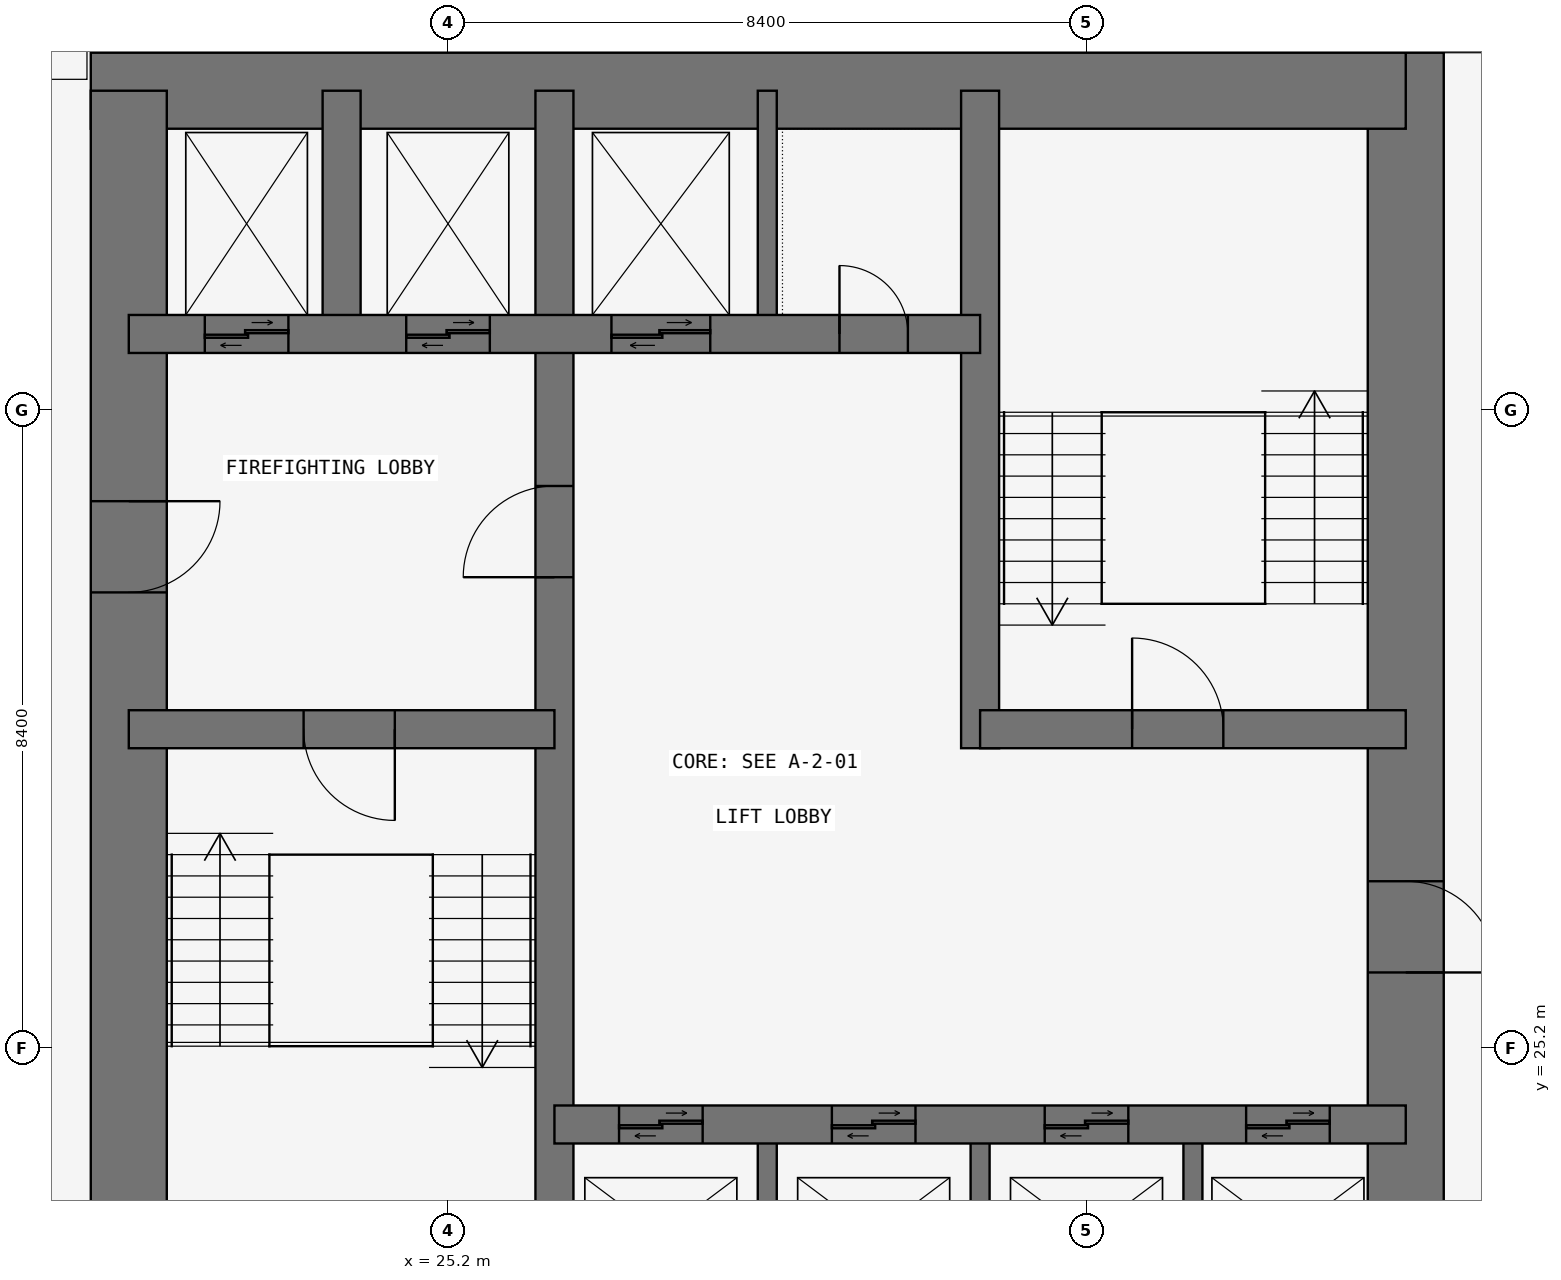
"""IFC4 building model, lengths in metres.
Left out: names, types, materials, properties, quantities, classifications, styles, units other than length and angle.
Written with IfcOpenShell. Run it as: python <this file> out.ifc"""

import sys

from ifc_helpers import new_model, si_unit, direction, frame, frame_2d, origin, place, context, subcontext, project, spatial, rectangle, extrude, element, fill, save


model = new_model("IFC4")
c1 = context("Model", 3, precision=1e-05, world=origin(), true_north=direction((0.0, 1.0)))
c2 = subcontext(c1, "Body", "Model", "MODEL_VIEW")
j1 = project(units=[si_unit("LENGTHUNIT", "METRE"), si_unit("PLANEANGLEUNIT", "RADIAN")], contexts=[c1])
p1 = place(None, origin())
s1 = spatial("IfcSite", under=j1, at=p1, CompositionType="ELEMENT")
p2 = place(p1, origin())
s2 = spatial("IfcBuilding", under=s1, at=p2, CompositionType="ELEMENT")
p3 = place(p2, frame((0.0, 0.0, -7.2)))
s3 = spatial("IfcBuildingStorey", under=s2, at=p3, CompositionType="ELEMENT", Elevation=-7.2)
p4 = place(p3, frame((37.8, 21.0, -0.4), z_axis=(0.0, 0.0, 1.0), x_axis=(0.0, 1.0, 0.0)))
e1 = element("IfcWall", 1, at=p4, inside=s3, PredefinedType="SHEAR", context=c2, shape_type="SweptSolid", body=[
    extrude(rectangle(XDim=17.3, YDim=1.0, at=frame_2d((8.65, 0.0))), origin(), (0.0, 0.0, 1.0), 4.0),
])
p5 = place(p4, frame((5.2, 0.0, 0.4)))
e2 = element("IfcOpeningElement", 2, at=p5, cuts=e1, PredefinedType="OPENING", context=c2, shape_type="SweptSolid", body=[
    extrude(rectangle(XDim=1.2, YDim=2.1, at=frame_2d((0.6, 1.05))), frame((0.0, 0.51, 0.0), z_axis=(0.0, -1.0, 0.0), x_axis=(1.0, 0.0, 0.0)), (0.0, 0.0, 1.0), 1.02),
])
p6 = place(p3, frame((37.8, 37.8, -0.4), z_axis=(0.0, 0.0, 1.0), x_axis=(-1.0, 0.0, 0.0)))
e3 = element("IfcWall", 3, at=p6, inside=s3, PredefinedType="SHEAR", context=c2, shape_type="SweptSolid", body=[
    extrude(rectangle(XDim=17.3, YDim=1.0, at=frame_2d((8.65, 0.0))), origin(), (0.0, 0.0, 1.0), 4.0),
])
p7 = place(p3, frame((21.0, 37.8, -0.4), z_axis=(0.0, 0.0, 1.0), x_axis=(0.0, -1.0, 0.0)))
e4 = element("IfcWall", 4, at=p7, inside=s3, PredefinedType="SHEAR", context=c2, shape_type="SweptSolid", body=[
    extrude(rectangle(XDim=17.3, YDim=1.0, at=frame_2d((8.65, 0.0))), origin(), (0.0, 0.0, 1.0), 4.0),
])
p8 = place(p7, frame((5.4, 0.0, 0.4)))
e5 = element("IfcOpeningElement", 5, at=p8, cuts=e4, PredefinedType="OPENING", context=c2, shape_type="SweptSolid", body=[
    extrude(rectangle(XDim=1.2, YDim=2.1, at=frame_2d((0.6, 1.05))), frame((0.0, 0.51, 0.0), z_axis=(0.0, -1.0, 0.0), x_axis=(1.0, 0.0, 0.0)), (0.0, 0.0, 1.0), 1.02),
])
p9 = place(p3, frame((26.6, 21.0, -0.4), z_axis=(0.0, 0.0, 1.0), x_axis=(0.0, 1.0, 0.0)))
e6 = element("IfcWall", 6, at=p9, inside=s3, PredefinedType="SHEAR", context=c2, shape_type="SweptSolid", body=[
    extrude(rectangle(XDim=16.8, YDim=0.5, at=frame_2d((8.4, 0.0))), origin(), (0.0, 0.0, 1.0), 4.0),
])
p10 = place(p9, frame((10.4, 0.0, 0.4)))
e7 = element("IfcOpeningElement", 7, at=p10, cuts=e6, PredefinedType="OPENING", context=c2, shape_type="SweptSolid", body=[
    extrude(rectangle(XDim=1.2, YDim=2.1, at=frame_2d((0.6, 1.05))), frame((0.0, 0.26, 0.0), z_axis=(0.0, -1.0, 0.0), x_axis=(1.0, 0.0, 0.0)), (0.0, 0.0, 1.0), 0.52),
])
p11 = place(p3, frame((21.0, 29.4, -0.4), z_axis=(0.0, 0.0, 1.0), x_axis=(1.0, 0.0, 0.0)))
e8 = element("IfcWall", 8, at=p11, inside=s3, PredefinedType="SHEAR", context=c2, shape_type="SweptSolid", body=[
    extrude(rectangle(XDim=5.6, YDim=0.5, at=frame_2d((2.8, 0.0))), origin(), (0.0, 0.0, 1.0), 4.0),
])
p12 = place(p11, frame((2.3, 0.0, 0.4)))
e9 = element("IfcOpeningElement", 9, at=p12, cuts=e8, PredefinedType="OPENING", context=c2, shape_type="SweptSolid", body=[
    extrude(rectangle(XDim=1.2, YDim=2.1, at=frame_2d((0.6, 1.05))), frame((0.0, 0.26, 0.0), z_axis=(0.0, -1.0, 0.0), x_axis=(1.0, 0.0, 0.0)), (0.0, 0.0, 1.0), 0.52),
])
p13 = place(p3, frame((21.0, 34.6, -0.4), z_axis=(0.0, 0.0, 1.0), x_axis=(1.0, 0.0, 0.0)))
e10 = element("IfcWall", 10, at=p13, inside=s3, PredefinedType="SHEAR", context=c2, shape_type="SweptSolid", body=[
    extrude(rectangle(XDim=11.2, YDim=0.5, at=frame_2d((5.6, 0.0))), origin(), (0.0, 0.0, 1.0), 4.0),
])
p14 = place(p13, frame((9.35, 0.0, 0.4)))
e11 = element("IfcOpeningElement", 11, at=p14, cuts=e10, PredefinedType="OPENING", context=c2, shape_type="SweptSolid", body=[
    extrude(rectangle(XDim=0.9, YDim=2.1, at=frame_2d((0.45, 1.05))), frame((0.0, 0.26, 0.0), z_axis=(0.0, -1.0, 0.0), x_axis=(1.0, 0.0, 0.0)), (0.0, 0.0, 1.0), 0.52),
])
p15 = place(p13, frame((1.0, 0.0, 0.4)))
e12 = element("IfcOpeningElement", 12, at=p15, cuts=e10, PredefinedType="OPENING", context=c2, shape_type="SweptSolid", body=[
    extrude(rectangle(XDim=1.1, YDim=2.1, at=frame_2d((0.55, 1.05))), frame((0.0, 0.26, 0.0), z_axis=(0.0, -1.0, 0.0), x_axis=(1.0, 0.0, 0.0)), (0.0, 0.0, 1.0), 0.52),
])
p16 = place(p13, frame((3.65, 0.0, 0.4)))
e13 = element("IfcOpeningElement", 13, at=p16, cuts=e10, PredefinedType="OPENING", context=c2, shape_type="SweptSolid", body=[
    extrude(rectangle(XDim=1.1, YDim=2.1, at=frame_2d((0.55, 1.05))), frame((0.0, 0.26, 0.0), z_axis=(0.0, -1.0, 0.0), x_axis=(1.0, 0.0, 0.0)), (0.0, 0.0, 1.0), 0.52),
])
p17 = place(p13, frame((6.35, 0.0, 0.4)))
e14 = element("IfcOpeningElement", 14, at=p17, cuts=e10, PredefinedType="OPENING", context=c2, shape_type="SweptSolid", body=[
    extrude(rectangle(XDim=1.3, YDim=2.1, at=frame_2d((0.65, 1.05))), frame((0.0, 0.26, 0.0), z_axis=(0.0, -1.0, 0.0), x_axis=(1.0, 0.0, 0.0)), (0.0, 0.0, 1.0), 0.52),
])
p18 = place(p3, frame((23.8, 34.6, -0.4), z_axis=(0.0, 0.0, 1.0), x_axis=(0.0, 1.0, 0.0)))
e15 = element("IfcWall", 15, at=p18, inside=s3, PredefinedType="SHEAR", context=c2, shape_type="SweptSolid", body=[
    extrude(rectangle(XDim=3.2, YDim=0.5, at=frame_2d((1.6, 0.0))), origin(), (0.0, 0.0, 1.0), 4.0),
])
p19 = place(p3, frame((26.6, 24.2, -0.4), z_axis=(0.0, 0.0, 1.0), x_axis=(1.0, 0.0, 0.0)))
e16 = element("IfcWall", 16, at=p19, inside=s3, PredefinedType="SHEAR", context=c2, shape_type="SweptSolid", body=[
    extrude(rectangle(XDim=11.2, YDim=0.5, at=frame_2d((5.6, 0.0))), origin(), (0.0, 0.0, 1.0), 4.0),
])
p20 = place(p19, frame((0.85, 0.0, 0.4)))
e17 = element("IfcOpeningElement", 17, at=p20, cuts=e16, PredefinedType="OPENING", context=c2, shape_type="SweptSolid", body=[
    extrude(rectangle(XDim=1.1, YDim=2.1, at=frame_2d((0.55, 1.05))), frame((0.0, 0.26, 0.0), z_axis=(0.0, -1.0, 0.0), x_axis=(1.0, 0.0, 0.0)), (0.0, 0.0, 1.0), 0.52),
])
p21 = place(p19, frame((3.65, 0.0, 0.4)))
e18 = element("IfcOpeningElement", 18, at=p21, cuts=e16, PredefinedType="OPENING", context=c2, shape_type="SweptSolid", body=[
    extrude(rectangle(XDim=1.1, YDim=2.1, at=frame_2d((0.55, 1.05))), frame((0.0, 0.26, 0.0), z_axis=(0.0, -1.0, 0.0), x_axis=(1.0, 0.0, 0.0)), (0.0, 0.0, 1.0), 0.52),
])
p22 = place(p19, frame((6.45, 0.0, 0.4)))
e19 = element("IfcOpeningElement", 19, at=p22, cuts=e16, PredefinedType="OPENING", context=c2, shape_type="SweptSolid", body=[
    extrude(rectangle(XDim=1.1, YDim=2.1, at=frame_2d((0.55, 1.05))), frame((0.0, 0.26, 0.0), z_axis=(0.0, -1.0, 0.0), x_axis=(1.0, 0.0, 0.0)), (0.0, 0.0, 1.0), 0.52),
])
p23 = place(p19, frame((9.1, 0.0, 0.4)))
e20 = element("IfcOpeningElement", 20, at=p23, cuts=e16, PredefinedType="OPENING", context=c2, shape_type="SweptSolid", body=[
    extrude(rectangle(XDim=1.1, YDim=2.1, at=frame_2d((0.55, 1.05))), frame((0.0, 0.26, 0.0), z_axis=(0.0, -1.0, 0.0), x_axis=(1.0, 0.0, 0.0)), (0.0, 0.0, 1.0), 0.52),
])
p24 = place(p3, frame((32.2, 29.15, -0.4), z_axis=(0.0, 0.0, 1.0), x_axis=(0.0, 1.0, 0.0)))
e21 = element("IfcWall", 21, at=p24, inside=s3, PredefinedType="SHEAR", context=c2, shape_type="SweptSolid", body=[
    extrude(rectangle(XDim=8.65, YDim=0.5, at=frame_2d((4.325, 0.0))), origin(), (0.0, 0.0, 1.0), 4.0),
])
p25 = place(p3, frame((32.2, 29.4, -0.4), z_axis=(0.0, 0.0, 1.0), x_axis=(1.0, 0.0, 0.0)))
e22 = element("IfcWall", 22, at=p25, inside=s3, PredefinedType="SHEAR", context=c2, shape_type="SweptSolid", body=[
    extrude(rectangle(XDim=5.6, YDim=0.5, at=frame_2d((2.8, 0.0))), origin(), (0.0, 0.0, 1.0), 4.0),
])
p26 = place(p25, frame((2.0, 0.0, 0.4)))
e23 = element("IfcOpeningElement", 23, at=p26, cuts=e22, PredefinedType="OPENING", context=c2, shape_type="SweptSolid", body=[
    extrude(rectangle(XDim=1.2, YDim=2.1, at=frame_2d((0.6, 1.05))), frame((0.0, 0.26, 0.0), z_axis=(0.0, -1.0, 0.0), x_axis=(1.0, 0.0, 0.0)), (0.0, 0.0, 1.0), 0.52),
])
for number, where, z_axis, x_axis in (
    (24, (29.4, 21.0, -0.4), (0.0, 0.0, 1.0), (0.0, 1.0, 0.0)),
    (25, (32.2, 21.0, -0.4), (0.0, 0.0, 1.0), (0.0, 1.0, 0.0)),
    (26, (35.0, 21.0, -0.4), (0.0, 0.0, 1.0), (0.0, 1.0, 0.0)),
    (27, (29.4, 34.6, -0.4), (0.0, 0.0, 1.0), (0.0, 1.0, 0.0)),
):
    element("IfcWall", number, at=place(p3, frame(where, z_axis=z_axis, x_axis=x_axis)), inside=s3, PredefinedType="SHEAR", context=c2, shape_type="SweptSolid", body=[
        extrude(rectangle(XDim=3.2, YDim=0.25, at=frame_2d((1.6, 0.0))), origin(), (0.0, 0.0, 1.0), 4.0),
    ])
p27 = place(p8, origin())
e28 = element("IfcDoor", 28, at=p27, inside=s3, OperationType="SINGLE_SWING_LEFT", PredefinedType="DOOR", context=c2, shape_type="SweptSolid", body=[
    extrude(rectangle(XDim=1.2, YDim=2.1, at=frame_2d((0.6, 1.05))), frame((0.0, 0.025, 0.0), z_axis=(0.0, -1.0, 0.0), x_axis=(1.0, 0.0, 0.0)), (0.0, 0.0, 1.0), 0.05),
])
fill(e5, e28)
p28 = place(p12, frame((1.2, 0.0, 0.0), z_axis=(0.0, 0.0, 1.0), x_axis=(-1.0, 0.0, 0.0)))
e29 = element("IfcDoor", 29, at=p28, inside=s3, OperationType="SINGLE_SWING_LEFT", PredefinedType="DOOR", context=c2, shape_type="SweptSolid", body=[
    extrude(rectangle(XDim=1.2, YDim=2.1, at=frame_2d((0.6, 1.05))), frame((0.0, 0.025, 0.0), z_axis=(0.0, -1.0, 0.0), x_axis=(1.0, 0.0, 0.0)), (0.0, 0.0, 1.0), 0.05),
])
fill(e9, e29)
p29 = place(p10, origin())
e30 = element("IfcDoor", 30, at=p29, inside=s3, OperationType="SINGLE_SWING_LEFT", PredefinedType="DOOR", context=c2, shape_type="SweptSolid", body=[
    extrude(rectangle(XDim=1.2, YDim=2.1, at=frame_2d((0.6, 1.05))), frame((0.0, 0.025, 0.0), z_axis=(0.0, -1.0, 0.0), x_axis=(1.0, 0.0, 0.0)), (0.0, 0.0, 1.0), 0.05),
])
fill(e7, e30)
p30 = place(p5, frame((1.2, 0.0, 0.0), z_axis=(0.0, 0.0, 1.0), x_axis=(-1.0, 0.0, 0.0)))
e31 = element("IfcDoor", 31, at=p30, inside=s3, OperationType="SINGLE_SWING_RIGHT", PredefinedType="DOOR", context=c2, shape_type="SweptSolid", body=[
    extrude(rectangle(XDim=1.2, YDim=2.1, at=frame_2d((0.6, 1.05))), frame((0.0, 0.025, 0.0), z_axis=(0.0, -1.0, 0.0), x_axis=(1.0, 0.0, 0.0)), (0.0, 0.0, 1.0), 0.05),
])
fill(e2, e31)
p31 = place(p26, origin())
e32 = element("IfcDoor", 32, at=p31, inside=s3, OperationType="SINGLE_SWING_LEFT", PredefinedType="DOOR", context=c2, shape_type="SweptSolid", body=[
    extrude(rectangle(XDim=1.2, YDim=2.1, at=frame_2d((0.6, 1.05))), frame((0.0, 0.025, 0.0), z_axis=(0.0, -1.0, 0.0), x_axis=(1.0, 0.0, 0.0)), (0.0, 0.0, 1.0), 0.05),
])
fill(e23, e32)
p32 = place(p14, origin())
e33 = element("IfcDoor", 33, at=p32, inside=s3, OperationType="SINGLE_SWING_LEFT", PredefinedType="DOOR", context=c2, shape_type="SweptSolid", body=[
    extrude(rectangle(XDim=0.9, YDim=2.1, at=frame_2d((0.45, 1.05))), frame((0.0, 0.025, 0.0), z_axis=(0.0, -1.0, 0.0), x_axis=(1.0, 0.0, 0.0)), (0.0, 0.0, 1.0), 0.05),
])
fill(e11, e33)
p33 = place(p20, origin())
e34 = element("IfcDoor", 34, at=p33, inside=s3, OperationType="DOUBLE_DOOR_SLIDING", PredefinedType="DOOR", context=c2, shape_type="SweptSolid", body=[
    extrude(rectangle(XDim=1.1, YDim=2.1, at=frame_2d((0.55, 1.05))), frame((0.0, 0.025, 0.0), z_axis=(0.0, -1.0, 0.0), x_axis=(1.0, 0.0, 0.0)), (0.0, 0.0, 1.0), 0.05),
])
fill(e17, e34)
p34 = place(p21, origin())
e35 = element("IfcDoor", 35, at=p34, inside=s3, OperationType="DOUBLE_DOOR_SLIDING", PredefinedType="DOOR", context=c2, shape_type="SweptSolid", body=[
    extrude(rectangle(XDim=1.1, YDim=2.1, at=frame_2d((0.55, 1.05))), frame((0.0, 0.025, 0.0), z_axis=(0.0, -1.0, 0.0), x_axis=(1.0, 0.0, 0.0)), (0.0, 0.0, 1.0), 0.05),
])
fill(e18, e35)
p35 = place(p22, origin())
e36 = element("IfcDoor", 36, at=p35, inside=s3, OperationType="DOUBLE_DOOR_SLIDING", PredefinedType="DOOR", context=c2, shape_type="SweptSolid", body=[
    extrude(rectangle(XDim=1.1, YDim=2.1, at=frame_2d((0.55, 1.05))), frame((0.0, 0.025, 0.0), z_axis=(0.0, -1.0, 0.0), x_axis=(1.0, 0.0, 0.0)), (0.0, 0.0, 1.0), 0.05),
])
fill(e19, e36)
p36 = place(p23, origin())
e37 = element("IfcDoor", 37, at=p36, inside=s3, OperationType="DOUBLE_DOOR_SLIDING", PredefinedType="DOOR", context=c2, shape_type="SweptSolid", body=[
    extrude(rectangle(XDim=1.1, YDim=2.1, at=frame_2d((0.55, 1.05))), frame((0.0, 0.025, 0.0), z_axis=(0.0, -1.0, 0.0), x_axis=(1.0, 0.0, 0.0)), (0.0, 0.0, 1.0), 0.05),
])
fill(e20, e37)
p37 = place(p15, origin())
e38 = element("IfcDoor", 38, at=p37, inside=s3, OperationType="DOUBLE_DOOR_SLIDING", PredefinedType="DOOR", context=c2, shape_type="SweptSolid", body=[
    extrude(rectangle(XDim=1.1, YDim=2.1, at=frame_2d((0.55, 1.05))), frame((0.0, 0.025, 0.0), z_axis=(0.0, -1.0, 0.0), x_axis=(1.0, 0.0, 0.0)), (0.0, 0.0, 1.0), 0.05),
])
fill(e12, e38)
p38 = place(p16, origin())
e39 = element("IfcDoor", 39, at=p38, inside=s3, OperationType="DOUBLE_DOOR_SLIDING", PredefinedType="DOOR", context=c2, shape_type="SweptSolid", body=[
    extrude(rectangle(XDim=1.1, YDim=2.1, at=frame_2d((0.55, 1.05))), frame((0.0, 0.025, 0.0), z_axis=(0.0, -1.0, 0.0), x_axis=(1.0, 0.0, 0.0)), (0.0, 0.0, 1.0), 0.05),
])
fill(e13, e39)
p39 = place(p17, origin())
e40 = element("IfcDoor", 40, at=p39, inside=s3, OperationType="DOUBLE_DOOR_SLIDING", PredefinedType="DOOR", context=c2, shape_type="SweptSolid", body=[
    extrude(rectangle(XDim=1.3, YDim=2.1, at=frame_2d((0.65, 1.05))), frame((0.0, 0.025, 0.0), z_axis=(0.0, -1.0, 0.0), x_axis=(1.0, 0.0, 0.0)), (0.0, 0.0, 1.0), 0.05),
])
fill(e14, e40)
save(model, sys.argv[1])
